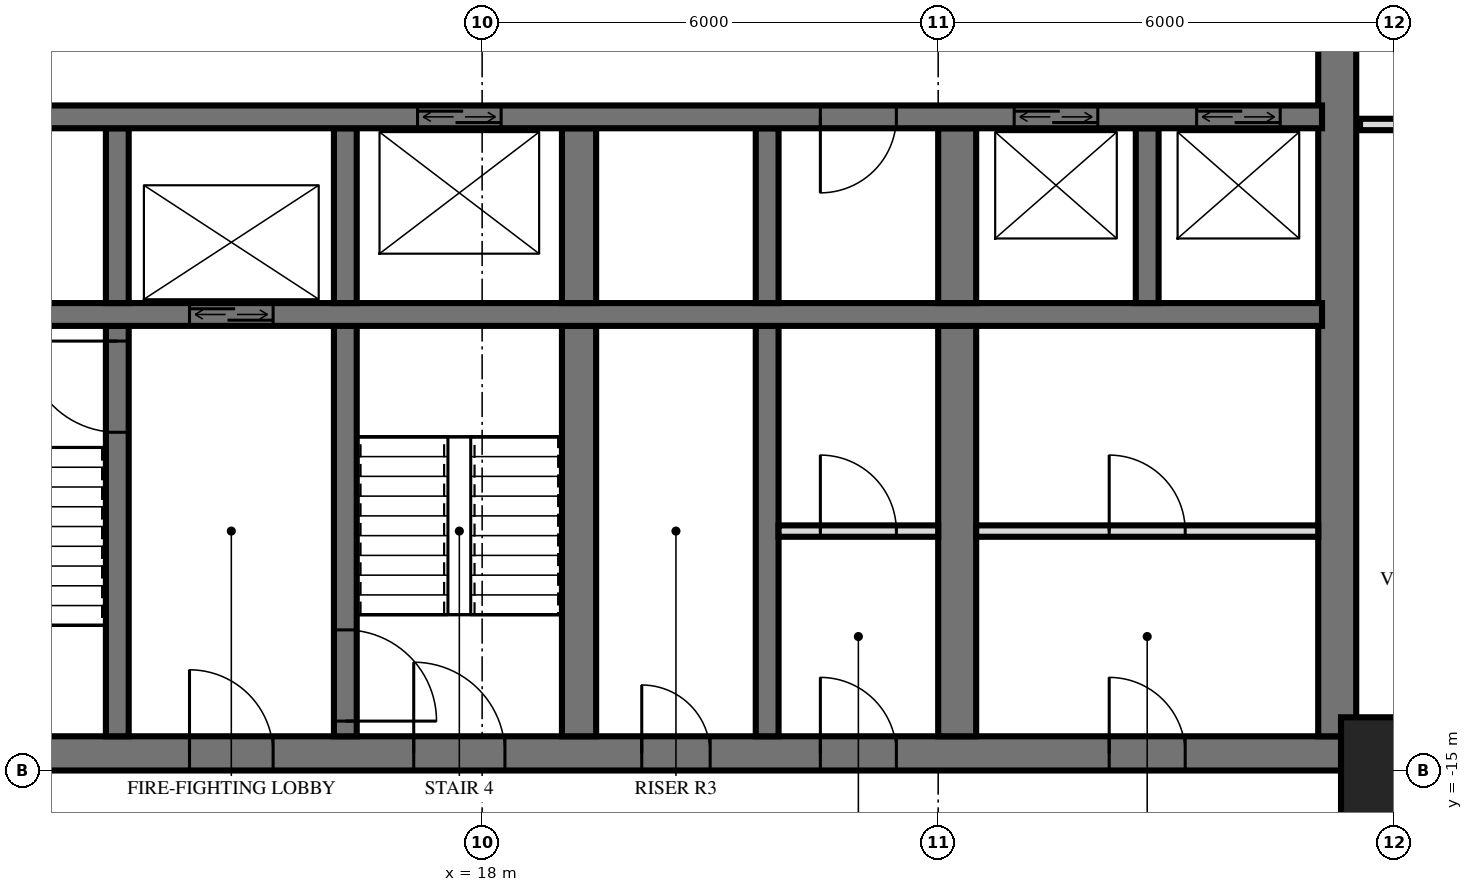
"""IFC4 building model, lengths in metres.
Left out: names, types, materials, properties, quantities, classifications, styles, units other than length and angle.
Written with IfcOpenShell. Run it as: python <this file> out.ifc"""

import sys

from ifc_helpers import new_model, si_unit, direction, frame, frame_2d, origin, origin_2d, place, context, subcontext, project, spatial, rectangle, extrude, element, fill, save


model = new_model("IFC4")
c1 = context("Model", 3, precision=1e-05, world=origin(), true_north=direction((0.0, 1.0)))
c2 = subcontext(c1, "Body", "Model", "MODEL_VIEW")
j1 = project(units=[si_unit("LENGTHUNIT", "METRE"), si_unit("PLANEANGLEUNIT", "RADIAN")], contexts=[c1])
p1 = place(None, origin())
s1 = spatial("IfcSite", under=j1, at=p1, CompositionType="ELEMENT")
p2 = place(p1, origin())
s2 = spatial("IfcBuilding", under=s1, at=p2, CompositionType="ELEMENT")
p3 = place(p2, frame((0.0, 0.0, 67.2)))
s3 = spatial("IfcBuildingStorey", under=s2, at=p3, CompositionType="ELEMENT", Elevation=67.2)
p4 = place(p3, frame((30.0, -15.0, 0.0), z_axis=(0.0, 0.0, 1.0), x_axis=(1.0, 0.0, 0.0)))
e1 = element("IfcColumn", 1, at=p4, inside=s3, PredefinedType="COLUMN", context=c2, shape_type="SweptSolid", body=[
    extrude(rectangle(XDim=1.4, YDim=1.4, at=origin_2d()), origin(), (0.0, 0.0, 1.0), 3.6),
])
p5 = place(p3, frame((10.0, -14.775, 0.0), z_axis=(0.0, 0.0, 1.0), x_axis=(1.0, 0.0, 0.0)))
e2 = element("IfcWall", 2, at=p5, inside=s3, PredefinedType="SHEAR", context=c2, shape_type="SweptSolid", body=[
    extrude(rectangle(XDim=19.5, YDim=0.45, at=frame_2d((9.75, 0.0))), origin(), (0.0, 0.0, 1.0), 3.6),
])
p6 = place(p5, frame((7.1, 0.0, 0.0)))
e3 = element("IfcOpeningElement", 3, at=p6, cuts=e2, PredefinedType="OPENING", context=c2, shape_type="SweptSolid", body=[
    extrude(rectangle(XDim=1.2, YDim=2.1, at=frame_2d((0.6, 1.05))), frame((0.0, 0.235, 0.0), z_axis=(0.0, -1.0, 0.0), x_axis=(1.0, 0.0, 0.0)), (0.0, 0.0, 1.0), 0.47),
])
p7 = place(p5, frame((4.15, 0.0, 0.0)))
e4 = element("IfcOpeningElement", 4, at=p7, cuts=e2, PredefinedType="OPENING", context=c2, shape_type="SweptSolid", body=[
    extrude(rectangle(XDim=1.1, YDim=2.1, at=frame_2d((0.55, 1.05))), frame((0.0, 0.235, 0.0), z_axis=(0.0, -1.0, 0.0), x_axis=(1.0, 0.0, 0.0)), (0.0, 0.0, 1.0), 0.47),
])
p8 = place(p5, frame((10.1, 0.0, 0.0)))
e5 = element("IfcOpeningElement", 5, at=p8, cuts=e2, PredefinedType="OPENING", context=c2, shape_type="SweptSolid", body=[
    extrude(rectangle(XDim=0.9, YDim=2.1, at=frame_2d((0.45, 1.05))), frame((0.0, 0.235, 0.0), z_axis=(0.0, -1.0, 0.0), x_axis=(1.0, 0.0, 0.0)), (0.0, 0.0, 1.0), 0.47),
])
p9 = place(p5, frame((12.45, 0.0, 0.0)))
e6 = element("IfcOpeningElement", 6, at=p9, cuts=e2, PredefinedType="OPENING", context=c2, shape_type="SweptSolid", body=[
    extrude(rectangle(XDim=1.0, YDim=2.1, at=frame_2d((0.5, 1.05))), frame((0.0, 0.235, 0.0), z_axis=(0.0, -1.0, 0.0), x_axis=(1.0, 0.0, 0.0)), (0.0, 0.0, 1.0), 0.47),
])
p10 = place(p5, frame((16.25, 0.0, 0.0)))
e7 = element("IfcOpeningElement", 7, at=p10, cuts=e2, PredefinedType="OPENING", context=c2, shape_type="SweptSolid", body=[
    extrude(rectangle(XDim=1.0, YDim=2.1, at=frame_2d((0.5, 1.05))), frame((0.0, 0.235, 0.0), z_axis=(0.0, -1.0, 0.0), x_axis=(1.0, 0.0, 0.0)), (0.0, 0.0, 1.0), 0.47),
])
p11 = place(p3, frame((29.25, -14.55, 0.0), z_axis=(0.0, 0.0, 1.0), x_axis=(0.0, 1.0, 0.0)))
e8 = element("IfcWall", 8, at=p11, inside=s3, PredefinedType="SHEAR", context=c2, shape_type="SweptSolid", body=[
    extrude(rectangle(XDim=14.1, YDim=0.5, at=frame_2d((7.05, 0.0))), origin(), (0.0, 0.0, 1.0), 3.6),
])
p12 = place(p3, frame((10.35, -6.4, 0.0), z_axis=(0.0, 0.0, 1.0), x_axis=(1.0, 0.0, 0.0)))
e9 = element("IfcWall", 9, at=p12, inside=s3, PredefinedType="SHEAR", context=c2, shape_type="SweptSolid", body=[
    extrude(rectangle(XDim=18.7, YDim=0.3, at=frame_2d((9.35, 0.0))), origin(), (0.0, 0.0, 1.0), 3.6),
])
p13 = place(p12, frame((14.65, 0.0, 0.0)))
e10 = element("IfcOpeningElement", 10, at=p13, cuts=e9, PredefinedType="OPENING", context=c2, shape_type="SweptSolid", body=[
    extrude(rectangle(XDim=1.1, YDim=2.1, at=frame_2d((0.55, 1.05))), frame((0.0, 0.16, 0.0), z_axis=(0.0, -1.0, 0.0), x_axis=(1.0, 0.0, 0.0)), (0.0, 0.0, 1.0), 0.32),
])
p14 = place(p12, frame((17.05, 0.0, 0.0)))
e11 = element("IfcOpeningElement", 11, at=p14, cuts=e9, PredefinedType="OPENING", context=c2, shape_type="SweptSolid", body=[
    extrude(rectangle(XDim=1.1, YDim=2.1, at=frame_2d((0.55, 1.05))), frame((0.0, 0.16, 0.0), z_axis=(0.0, -1.0, 0.0), x_axis=(1.0, 0.0, 0.0)), (0.0, 0.0, 1.0), 0.32),
])
p15 = place(p12, frame((6.8, 0.0, 0.0)))
e12 = element("IfcOpeningElement", 12, at=p15, cuts=e9, PredefinedType="OPENING", context=c2, shape_type="SweptSolid", body=[
    extrude(rectangle(XDim=1.1, YDim=2.1, at=frame_2d((0.55, 1.05))), frame((0.0, 0.16, 0.0), z_axis=(0.0, -1.0, 0.0), x_axis=(1.0, 0.0, 0.0)), (0.0, 0.0, 1.0), 0.32),
])
p16 = place(p12, frame((12.1, 0.0, 0.0)))
e13 = element("IfcOpeningElement", 13, at=p16, cuts=e9, PredefinedType="OPENING", context=c2, shape_type="SweptSolid", body=[
    extrude(rectangle(XDim=1.0, YDim=2.1, at=frame_2d((0.5, 1.05))), frame((0.0, 0.16, 0.0), z_axis=(0.0, -1.0, 0.0), x_axis=(1.0, 0.0, 0.0)), (0.0, 0.0, 1.0), 0.32),
])
p17 = place(p3, frame((10.35, -9.0, 0.0), z_axis=(0.0, 0.0, 1.0), x_axis=(1.0, 0.0, 0.0)))
e14 = element("IfcWall", 14, at=p17, inside=s3, PredefinedType="SHEAR", context=c2, shape_type="SweptSolid", body=[
    extrude(rectangle(XDim=18.7, YDim=0.3, at=frame_2d((9.35, 0.0))), origin(), (0.0, 0.0, 1.0), 3.6),
])
p18 = place(p17, frame((3.8, 0.0, 0.0)))
e15 = element("IfcOpeningElement", 15, at=p18, cuts=e14, PredefinedType="OPENING", context=c2, shape_type="SweptSolid", body=[
    extrude(rectangle(XDim=1.1, YDim=2.1, at=frame_2d((0.55, 1.05))), frame((0.0, 0.16, 0.0), z_axis=(0.0, -1.0, 0.0), x_axis=(1.0, 0.0, 0.0)), (0.0, 0.0, 1.0), 0.32),
])
p19 = place(p3, frame((13.2, -8.85, 0.0), z_axis=(0.0, 0.0, 1.0), x_axis=(0.0, 1.0, 0.0)))
e16 = element("IfcWall", 16, at=p19, inside=s3, PredefinedType="SHEAR", context=c2, shape_type="SweptSolid", body=[
    extrude(rectangle(XDim=2.3, YDim=0.3, at=frame_2d((1.15, 0.0))), origin(), (0.0, 0.0, 1.0), 3.6),
])
p20 = place(p3, frame((13.2, -14.55, 0.0), z_axis=(0.0, 0.0, 1.0), x_axis=(0.0, 1.0, 0.0)))
e17 = element("IfcWall", 17, at=p20, inside=s3, PredefinedType="SHEAR", context=c2, shape_type="SweptSolid", body=[
    extrude(rectangle(XDim=5.4, YDim=0.3, at=frame_2d((2.7, 0.0))), origin(), (0.0, 0.0, 1.0), 3.6),
])
p21 = place(p20, frame((4.0, 0.0, 0.0)))
e18 = element("IfcOpeningElement", 18, at=p21, cuts=e17, PredefinedType="OPENING", context=c2, shape_type="SweptSolid", body=[
    extrude(rectangle(XDim=1.2, YDim=2.1, at=frame_2d((0.6, 1.05))), frame((0.0, 0.16, 0.0), z_axis=(0.0, -1.0, 0.0), x_axis=(1.0, 0.0, 0.0)), (0.0, 0.0, 1.0), 0.32),
])
p22 = place(p3, frame((16.2, -8.85, 0.0), z_axis=(0.0, 0.0, 1.0), x_axis=(0.0, 1.0, 0.0)))
e19 = element("IfcWall", 19, at=p22, inside=s3, PredefinedType="SHEAR", context=c2, shape_type="SweptSolid", body=[
    extrude(rectangle(XDim=2.3, YDim=0.3, at=frame_2d((1.15, 0.0))), origin(), (0.0, 0.0, 1.0), 3.6),
])
p23 = place(p3, frame((16.2, -14.55, 0.0), z_axis=(0.0, 0.0, 1.0), x_axis=(0.0, 1.0, 0.0)))
e20 = element("IfcWall", 20, at=p23, inside=s3, PredefinedType="SHEAR", context=c2, shape_type="SweptSolid", body=[
    extrude(rectangle(XDim=5.4, YDim=0.3, at=frame_2d((2.7, 0.0))), origin(), (0.0, 0.0, 1.0), 3.6),
])
p24 = place(p23, frame((0.2, 0.0, 0.0)))
e21 = element("IfcOpeningElement", 21, at=p24, cuts=e20, PredefinedType="OPENING", context=c2, shape_type="SweptSolid", body=[
    extrude(rectangle(XDim=1.2, YDim=2.1, at=frame_2d((0.6, 1.05))), frame((0.0, 0.16, 0.0), z_axis=(0.0, -1.0, 0.0), x_axis=(1.0, 0.0, 0.0)), (0.0, 0.0, 1.0), 0.32),
])
p25 = place(p3, frame((19.275, -8.85, 0.0), z_axis=(0.0, 0.0, 1.0), x_axis=(0.0, 1.0, 0.0)))
e22 = element("IfcWall", 22, at=p25, inside=s3, PredefinedType="SHEAR", context=c2, shape_type="SweptSolid", body=[
    extrude(rectangle(XDim=2.3, YDim=0.45, at=frame_2d((1.15, 0.0))), origin(), (0.0, 0.0, 1.0), 3.6),
])
p26 = place(p3, frame((19.275, -14.55, 0.0), z_axis=(0.0, 0.0, 1.0), x_axis=(0.0, 1.0, 0.0)))
e23 = element("IfcWall", 23, at=p26, inside=s3, PredefinedType="SHEAR", context=c2, shape_type="SweptSolid", body=[
    extrude(rectangle(XDim=5.4, YDim=0.45, at=frame_2d((2.7, 0.0))), origin(), (0.0, 0.0, 1.0), 3.6),
])
p27 = place(p3, frame((21.75, -8.85, 0.0), z_axis=(0.0, 0.0, 1.0), x_axis=(0.0, 1.0, 0.0)))
e24 = element("IfcWall", 24, at=p27, inside=s3, PredefinedType="SHEAR", context=c2, shape_type="SweptSolid", body=[
    extrude(rectangle(XDim=2.3, YDim=0.3, at=frame_2d((1.15, 0.0))), origin(), (0.0, 0.0, 1.0), 3.6),
])
p28 = place(p3, frame((21.75, -14.55, 0.0), z_axis=(0.0, 0.0, 1.0), x_axis=(0.0, 1.0, 0.0)))
e25 = element("IfcWall", 25, at=p28, inside=s3, PredefinedType="SHEAR", context=c2, shape_type="SweptSolid", body=[
    extrude(rectangle(XDim=5.4, YDim=0.3, at=frame_2d((2.7, 0.0))), origin(), (0.0, 0.0, 1.0), 3.6),
])
p29 = place(p3, frame((24.25, -8.85, 0.0), z_axis=(0.0, 0.0, 1.0), x_axis=(0.0, 1.0, 0.0)))
e26 = element("IfcWall", 26, at=p29, inside=s3, PredefinedType="SHEAR", context=c2, shape_type="SweptSolid", body=[
    extrude(rectangle(XDim=2.3, YDim=0.5, at=frame_2d((1.15, 0.0))), origin(), (0.0, 0.0, 1.0), 3.6),
])
p30 = place(p3, frame((24.25, -14.55, 0.0), z_axis=(0.0, 0.0, 1.0), x_axis=(0.0, 1.0, 0.0)))
e27 = element("IfcWall", 27, at=p30, inside=s3, PredefinedType="SHEAR", context=c2, shape_type="SweptSolid", body=[
    extrude(rectangle(XDim=5.4, YDim=0.5, at=frame_2d((2.7, 0.0))), origin(), (0.0, 0.0, 1.0), 3.6),
])
p31 = place(p3, frame((26.75, -8.85, 0.0), z_axis=(0.0, 0.0, 1.0), x_axis=(0.0, 1.0, 0.0)))
e28 = element("IfcWall", 28, at=p31, inside=s3, PredefinedType="SHEAR", context=c2, shape_type="SweptSolid", body=[
    extrude(rectangle(XDim=2.3, YDim=0.3, at=frame_2d((1.15, 0.0))), origin(), (0.0, 0.0, 1.0), 3.6),
])
p32 = place(p3, frame((21.9, -11.85, 0.0), z_axis=(0.0, 0.0, 1.0), x_axis=(1.0, 0.0, 0.0)))
e29 = element("IfcWall", 29, at=p32, inside=s3, PredefinedType="PARTITIONING", context=c2, shape_type="SweptSolid", body=[
    extrude(rectangle(XDim=2.1, YDim=0.15, at=frame_2d((1.05, 0.0))), origin(), (0.0, 0.0, 1.0), 3.3),
])
p33 = place(p32, frame((0.55, 0.0, 0.0)))
e30 = element("IfcOpeningElement", 30, at=p33, cuts=e29, PredefinedType="OPENING", context=c2, shape_type="SweptSolid", body=[
    extrude(rectangle(XDim=1.0, YDim=2.1, at=frame_2d((0.5, 1.05))), frame((0.0, 0.085, 0.0), z_axis=(0.0, -1.0, 0.0), x_axis=(1.0, 0.0, 0.0)), (0.0, 0.0, 1.0), 0.17),
])
p34 = place(p3, frame((24.5, -11.85, 0.0), z_axis=(0.0, 0.0, 1.0), x_axis=(1.0, 0.0, 0.0)))
e31 = element("IfcWall", 31, at=p34, inside=s3, PredefinedType="PARTITIONING", context=c2, shape_type="SweptSolid", body=[
    extrude(rectangle(XDim=4.5, YDim=0.15, at=frame_2d((2.25, 0.0))), origin(), (0.0, 0.0, 1.0), 3.3),
])
p35 = place(p34, frame((1.75, 0.0, 0.0)))
e32 = element("IfcOpeningElement", 32, at=p35, cuts=e31, PredefinedType="OPENING", context=c2, shape_type="SweptSolid", body=[
    extrude(rectangle(XDim=1.0, YDim=2.1, at=frame_2d((0.5, 1.05))), frame((0.0, 0.085, 0.0), z_axis=(0.0, -1.0, 0.0), x_axis=(1.0, 0.0, 0.0)), (0.0, 0.0, 1.0), 0.17),
])
p36 = place(p3, frame((29.55, -15.0, 0.0), z_axis=(0.0, 0.0, 1.0), x_axis=(1.0, 0.0, 0.0)))
e33 = element("IfcWall", 33, at=p36, inside=s3, PredefinedType="PARTITIONING", context=c2, shape_type="SweptSolid", body=[
    extrude(rectangle(XDim=3.57, YDim=0.15, at=frame_2d((1.785, 0.0))), origin(), (0.0, 0.0, 1.0), 3.32),
])
p37 = place(p36, frame((1.205, 0.0, 0.0)))
e34 = element("IfcOpeningElement", 34, at=p37, cuts=e33, PredefinedType="OPENING", context=c2, shape_type="SweptSolid", body=[
    extrude(rectangle(XDim=0.8, YDim=2.1, at=frame_2d((0.4, 1.05))), frame((0.0, 0.085, 0.0), z_axis=(0.0, -1.0, 0.0), x_axis=(1.0, 0.0, 0.0)), (0.0, 0.0, 1.0), 0.17),
])
p38 = place(p3, frame((29.55, -6.5, 0.0), z_axis=(0.0, 0.0, 1.0), x_axis=(1.0, 0.0, 0.0)))
e35 = element("IfcWall", 35, at=p38, inside=s3, PredefinedType="PARTITIONING", context=c2, shape_type="SweptSolid", body=[
    extrude(rectangle(XDim=3.57, YDim=0.15, at=frame_2d((1.785, 0.0))), origin(), (0.0, 0.0, 1.0), 3.32),
])
p39 = place(p38, frame((1.4, 0.0, 0.0)))
e36 = element("IfcOpeningElement", 36, at=p39, cuts=e35, PredefinedType="OPENING", context=c2, shape_type="SweptSolid", body=[
    extrude(rectangle(XDim=0.9, YDim=2.1, at=frame_2d((0.45, 1.05))), frame((0.0, 0.085, 0.0), z_axis=(0.0, -1.0, 0.0), x_axis=(1.0, 0.0, 0.0)), (0.0, 0.0, 1.0), 0.17),
])
p40 = place(p13, origin())
e37 = element("IfcDoor", 37, at=p40, inside=s3, OperationType="DOUBLE_DOOR_SLIDING", PredefinedType="USERDEFINED", context=c2, shape_type="SweptSolid", body=[
    extrude(rectangle(XDim=1.1, YDim=2.1, at=frame_2d((0.55, 1.05))), frame((0.0, 0.025, 0.0), z_axis=(0.0, -1.0, 0.0), x_axis=(1.0, 0.0, 0.0)), (0.0, 0.0, 1.0), 0.05),
])
fill(e10, e37)
p41 = place(p14, origin())
e38 = element("IfcDoor", 38, at=p41, inside=s3, OperationType="DOUBLE_DOOR_SLIDING", PredefinedType="USERDEFINED", context=c2, shape_type="SweptSolid", body=[
    extrude(rectangle(XDim=1.1, YDim=2.1, at=frame_2d((0.55, 1.05))), frame((0.0, 0.025, 0.0), z_axis=(0.0, -1.0, 0.0), x_axis=(1.0, 0.0, 0.0)), (0.0, 0.0, 1.0), 0.05),
])
fill(e11, e38)
p42 = place(p18, origin())
e39 = element("IfcDoor", 39, at=p42, inside=s3, OperationType="DOUBLE_DOOR_SLIDING", PredefinedType="USERDEFINED", context=c2, shape_type="SweptSolid", body=[
    extrude(rectangle(XDim=1.1, YDim=2.1, at=frame_2d((0.55, 1.05))), frame((0.0, 0.025, 0.0), z_axis=(0.0, -1.0, 0.0), x_axis=(1.0, 0.0, 0.0)), (0.0, 0.0, 1.0), 0.05),
])
fill(e15, e39)
p43 = place(p15, origin())
e40 = element("IfcDoor", 40, at=p43, inside=s3, OperationType="DOUBLE_DOOR_SLIDING", PredefinedType="USERDEFINED", context=c2, shape_type="SweptSolid", body=[
    extrude(rectangle(XDim=1.1, YDim=2.1, at=frame_2d((0.55, 1.05))), frame((0.0, 0.025, 0.0), z_axis=(0.0, -1.0, 0.0), x_axis=(1.0, 0.0, 0.0)), (0.0, 0.0, 1.0), 0.05),
])
fill(e12, e40)
p44 = place(p6, origin())
e41 = element("IfcDoor", 41, at=p44, inside=s3, OperationType="SINGLE_SWING_RIGHT", PredefinedType="DOOR", context=c2, shape_type="SweptSolid", body=[
    extrude(rectangle(XDim=1.2, YDim=2.1, at=frame_2d((0.6, 1.05))), frame((0.0, 0.025, 0.0), z_axis=(0.0, -1.0, 0.0), x_axis=(1.0, 0.0, 0.0)), (0.0, 0.0, 1.0), 0.05),
])
fill(e3, e41)
p45 = place(p7, origin())
e42 = element("IfcDoor", 42, at=p45, inside=s3, OperationType="SINGLE_SWING_RIGHT", PredefinedType="DOOR", context=c2, shape_type="SweptSolid", body=[
    extrude(rectangle(XDim=1.1, YDim=2.1, at=frame_2d((0.55, 1.05))), frame((0.0, 0.025, 0.0), z_axis=(0.0, -1.0, 0.0), x_axis=(1.0, 0.0, 0.0)), (0.0, 0.0, 1.0), 0.05),
])
fill(e4, e42)
p46 = place(p8, origin())
e43 = element("IfcDoor", 43, at=p46, inside=s3, OperationType="SINGLE_SWING_RIGHT", PredefinedType="DOOR", context=c2, shape_type="SweptSolid", body=[
    extrude(rectangle(XDim=0.9, YDim=2.1, at=frame_2d((0.45, 1.05))), frame((0.0, 0.025, 0.0), z_axis=(0.0, -1.0, 0.0), x_axis=(1.0, 0.0, 0.0)), (0.0, 0.0, 1.0), 0.05),
])
fill(e5, e43)
p47 = place(p9, origin())
e44 = element("IfcDoor", 44, at=p47, inside=s3, OperationType="SINGLE_SWING_RIGHT", PredefinedType="DOOR", context=c2, shape_type="SweptSolid", body=[
    extrude(rectangle(XDim=1.0, YDim=2.1, at=frame_2d((0.5, 1.05))), frame((0.0, 0.025, 0.0), z_axis=(0.0, -1.0, 0.0), x_axis=(1.0, 0.0, 0.0)), (0.0, 0.0, 1.0), 0.05),
])
fill(e6, e44)
p48 = place(p10, origin())
e45 = element("IfcDoor", 45, at=p48, inside=s3, OperationType="SINGLE_SWING_RIGHT", PredefinedType="DOOR", context=c2, shape_type="SweptSolid", body=[
    extrude(rectangle(XDim=1.0, YDim=2.1, at=frame_2d((0.5, 1.05))), frame((0.0, 0.025, 0.0), z_axis=(0.0, -1.0, 0.0), x_axis=(1.0, 0.0, 0.0)), (0.0, 0.0, 1.0), 0.05),
])
fill(e7, e45)
p49 = place(p16, frame((0.5, 0.0, 0.0), z_axis=(0.0, 0.0, 1.0), x_axis=(-1.0, 0.0, 0.0)))
e46 = element("IfcDoor", 46, at=p49, inside=s3, OperationType="SINGLE_SWING_LEFT", PredefinedType="DOOR", context=c2, shape_type="SweptSolid", body=[
    extrude(rectangle(XDim=1.0, YDim=2.1, at=frame_2d((0.0, 1.05))), frame((0.0, -0.025, 0.0), z_axis=(0.0, 1.0, 0.0), x_axis=(-1.0, 0.0, 0.0)), (0.0, 0.0, 1.0), 0.05),
])
fill(e13, e46)
p50 = place(p21, origin())
e47 = element("IfcDoor", 47, at=p50, inside=s3, OperationType="SINGLE_SWING_LEFT", PredefinedType="DOOR", context=c2, shape_type="SweptSolid", body=[
    extrude(rectangle(XDim=1.2, YDim=2.1, at=frame_2d((0.6, 1.05))), frame((0.0, 0.025, 0.0), z_axis=(0.0, -1.0, 0.0), x_axis=(1.0, 0.0, 0.0)), (0.0, 0.0, 1.0), 0.05),
])
fill(e18, e47)
p51 = place(p24, frame((0.6, 0.0, 0.0), z_axis=(0.0, 0.0, 1.0), x_axis=(-1.0, 0.0, 0.0)))
e48 = element("IfcDoor", 48, at=p51, inside=s3, OperationType="SINGLE_SWING_LEFT", PredefinedType="DOOR", context=c2, shape_type="SweptSolid", body=[
    extrude(rectangle(XDim=1.2, YDim=2.1, at=frame_2d((0.0, 1.05))), frame((0.0, -0.025, 0.0), z_axis=(0.0, 1.0, 0.0), x_axis=(-1.0, 0.0, 0.0)), (0.0, 0.0, 1.0), 0.05),
])
fill(e21, e48)
p52 = place(p33, origin())
e49 = element("IfcDoor", 49, at=p52, inside=s3, OperationType="SINGLE_SWING_RIGHT", PredefinedType="DOOR", context=c2, shape_type="SweptSolid", body=[
    extrude(rectangle(XDim=1.0, YDim=2.1, at=frame_2d((0.5, 1.05))), frame((0.0, 0.025, 0.0), z_axis=(0.0, -1.0, 0.0), x_axis=(1.0, 0.0, 0.0)), (0.0, 0.0, 1.0), 0.05),
])
fill(e30, e49)
p53 = place(p35, origin())
e50 = element("IfcDoor", 50, at=p53, inside=s3, OperationType="SINGLE_SWING_RIGHT", PredefinedType="DOOR", context=c2, shape_type="SweptSolid", body=[
    extrude(rectangle(XDim=1.0, YDim=2.1, at=frame_2d((0.5, 1.05))), frame((0.0, 0.025, 0.0), z_axis=(0.0, -1.0, 0.0), x_axis=(1.0, 0.0, 0.0)), (0.0, 0.0, 1.0), 0.05),
])
fill(e32, e50)
save(model, sys.argv[1])
